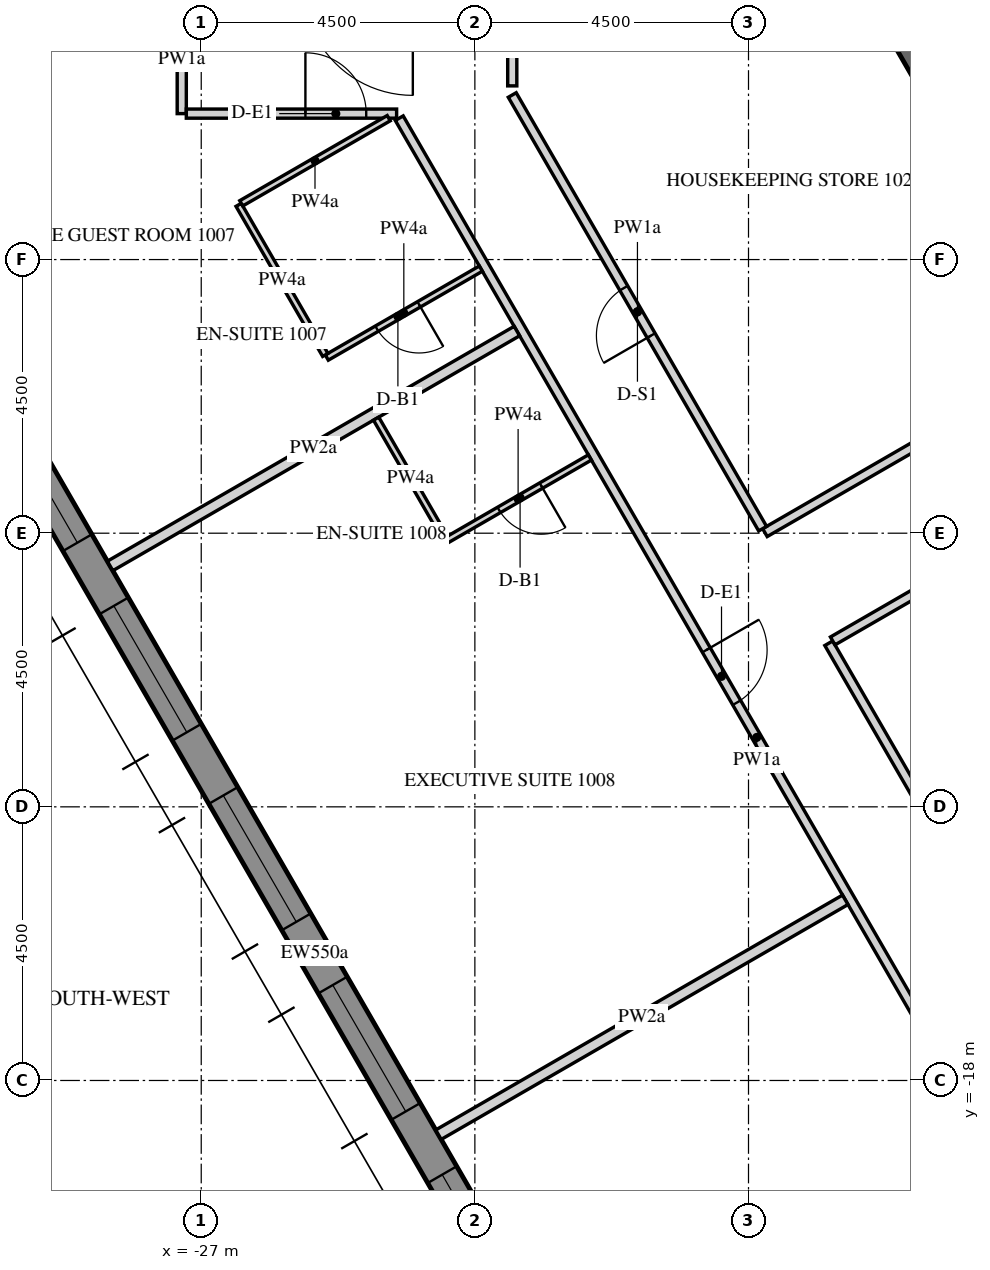
"""IFC4 building model, lengths in metres.
Left out: names, types, materials, properties, quantities, classifications, styles, units other than length and angle.
Written with IfcOpenShell. Run it as: python <this file> out.ifc"""

import sys

from ifc_helpers import new_model, si_unit, direction, frame, frame_2d, origin, place, context, subcontext, project, spatial, polyline, rectangle, outline, extrude, element, fill, save


model = new_model("IFC4")
c1 = context("Model", 3, precision=1e-05, world=origin(), true_north=direction((0.0, 1.0)))
c2 = subcontext(c1, "Body", "Model", "MODEL_VIEW")
j1 = project(units=[si_unit("LENGTHUNIT", "METRE"), si_unit("PLANEANGLEUNIT", "RADIAN")], contexts=[c1])
p1 = place(None, origin())
s1 = spatial("IfcSite", under=j1, at=p1, CompositionType="ELEMENT")
p2 = place(p1, origin())
s2 = spatial("IfcBuilding", under=s1, at=p2, CompositionType="ELEMENT")
p3 = place(p2, frame((0.0, 0.0, 142.8)))
s3 = spatial("IfcBuildingStorey", under=s2, at=p3, CompositionType="ELEMENT", Elevation=142.8)
p4 = place(p3, frame((-32.655, -2.89, -0.15), z_axis=(0.0, 0.0, 1.0), x_axis=(0.499997711317, -0.866026725152, 0.0)))
e1 = element("IfcWall", 1, at=p4, inside=s3, PredefinedType="SOLIDWALL", context=c2, shape_type="SweptSolid", body=[
    extrude(outline(polyline([(-0.022, -0.275), (30.097, -0.275), (30.045, 0.275), (0.022, 0.275), (-0.022, -0.275)])), origin(), (0.0, 0.0, 1.0), 3.75),
])
p5 = place(p4, frame((1.236, 0.0, 1.05)))
e2 = element("IfcOpeningElement", 2, at=p5, cuts=e1, PredefinedType="OPENING", context=c2, shape_type="SweptSolid", body=[
    extrude(rectangle(XDim=2.4, YDim=2.4, at=frame_2d((1.2, 1.2))), frame((0.0, 0.285, 0.0), z_axis=(0.0, -1.0, 0.0), x_axis=(1.0, 0.0, 0.0)), (0.0, 0.0, 1.0), 0.57),
])
p6 = place(p4, frame((4.835, 0.0, 1.05)))
e3 = element("IfcOpeningElement", 3, at=p6, cuts=e1, PredefinedType="OPENING", context=c2, shape_type="SweptSolid", body=[
    extrude(rectangle(XDim=2.4, YDim=2.4, at=frame_2d((1.2, 1.2))), frame((0.0, 0.285, 0.0), z_axis=(0.0, -1.0, 0.0), x_axis=(1.0, 0.0, 0.0)), (0.0, 0.0, 1.0), 0.57),
])
p7 = place(p4, frame((8.436, 0.0, 1.05)))
e4 = element("IfcOpeningElement", 4, at=p7, cuts=e1, PredefinedType="OPENING", context=c2, shape_type="SweptSolid", body=[
    extrude(rectangle(XDim=2.4, YDim=2.4, at=frame_2d((1.2, 1.2))), frame((0.0, 0.285, 0.0), z_axis=(0.0, -1.0, 0.0), x_axis=(1.0, 0.0, 0.0)), (0.0, 0.0, 1.0), 0.57),
])
p8 = place(p4, frame((12.035, 0.0, 1.05)))
e5 = element("IfcOpeningElement", 5, at=p8, cuts=e1, PredefinedType="OPENING", context=c2, shape_type="SweptSolid", body=[
    extrude(rectangle(XDim=2.4, YDim=2.4, at=frame_2d((1.2, 1.2))), frame((0.0, 0.285, 0.0), z_axis=(0.0, -1.0, 0.0), x_axis=(1.0, 0.0, 0.0)), (0.0, 0.0, 1.0), 0.57),
])
p9 = place(p4, frame((15.635, 0.0, 1.05)))
e6 = element("IfcOpeningElement", 6, at=p9, cuts=e1, PredefinedType="OPENING", context=c2, shape_type="SweptSolid", body=[
    extrude(rectangle(XDim=2.4, YDim=2.4, at=frame_2d((1.2, 1.2))), frame((0.0, 0.285, 0.0), z_axis=(0.0, -1.0, 0.0), x_axis=(1.0, 0.0, 0.0)), (0.0, 0.0, 1.0), 0.57),
])
p10 = place(p4, frame((19.236, 0.0, 1.05)))
e7 = element("IfcOpeningElement", 7, at=p10, cuts=e1, PredefinedType="OPENING", context=c2, shape_type="SweptSolid", body=[
    extrude(rectangle(XDim=2.4, YDim=2.4, at=frame_2d((1.2, 1.2))), frame((0.0, 0.285, 0.0), z_axis=(0.0, -1.0, 0.0), x_axis=(1.0, 0.0, 0.0)), (0.0, 0.0, 1.0), 0.57),
])
p11 = place(p4, frame((22.835, 0.0, 1.05)))
e8 = element("IfcOpeningElement", 8, at=p11, cuts=e1, PredefinedType="OPENING", context=c2, shape_type="SweptSolid", body=[
    extrude(rectangle(XDim=2.4, YDim=2.4, at=frame_2d((1.2, 1.2))), frame((0.0, 0.285, 0.0), z_axis=(0.0, -1.0, 0.0), x_axis=(1.0, 0.0, 0.0)), (0.0, 0.0, 1.0), 0.57),
])
p12 = place(p4, frame((26.436, 0.0, 1.05)))
e9 = element("IfcOpeningElement", 9, at=p12, cuts=e1, PredefinedType="OPENING", context=c2, shape_type="SweptSolid", body=[
    extrude(rectangle(XDim=2.4, YDim=2.4, at=frame_2d((1.2, 1.2))), frame((0.0, 0.285, 0.0), z_axis=(0.0, -1.0, 0.0), x_axis=(1.0, 0.0, 0.0)), (0.0, 0.0, 1.0), 0.57),
])
p13 = place(p3, frame((-15.819, 0.0, -0.15), z_axis=(0.0, 0.0, 1.0), x_axis=(0.499999880136, -0.866025472988, 0.0)))
e10 = element("IfcWall", 10, at=p13, inside=s3, PredefinedType="SHEAR", context=c2, shape_type="SweptSolid", body=[
    extrude(outline(polyline([(-0.173, -0.3), (15.993, -0.3), (15.646, 0.3), (0.173, 0.3), (-0.173, -0.3)])), origin(), (0.0, 0.0, 1.0), 3.75),
])
p14 = place(p13, frame((6.981, 0.0, 0.15)))
e11 = element("IfcOpeningElement", 11, at=p14, cuts=e10, PredefinedType="OPENING", context=c2, shape_type="SweptSolid", body=[
    extrude(rectangle(XDim=1.8, YDim=2.4, at=frame_2d((0.9, 1.2))), frame((0.0, 0.31, 0.0), z_axis=(0.0, -1.0, 0.0), x_axis=(1.0, 0.0, 0.0)), (0.0, 0.0, 1.0), 0.62),
])
p15 = place(p3, frame((-27.32, -0.3, 0.0), z_axis=(0.0, 0.0, 1.0), x_axis=(0.0, -1.0, 0.0)))
e12 = element("IfcWall", 12, at=p15, inside=s3, PredefinedType="PARTITIONING", context=c2, shape_type="SweptSolid", body=[
    extrude(rectangle(XDim=1.8, YDim=0.15, at=frame_2d((0.9, 0.0))), origin(), (0.0, 0.0, 1.0), 2.838),
])
p16 = place(p3, frame((-27.245, -2.1, 0.0), z_axis=(0.0, 0.0, 1.0), x_axis=(1.0, 0.0, 0.0)))
e13 = element("IfcWall", 13, at=p16, inside=s3, PredefinedType="PARTITIONING", context=c2, shape_type="SweptSolid", body=[
    extrude(rectangle(XDim=3.458, YDim=0.15, at=frame_2d((1.729, 0.0))), origin(), (0.0, 0.0, 1.0), 2.838),
])
p17 = place(p16, frame((1.958, 0.0, 0.0)))
e14 = element("IfcOpeningElement", 14, at=p17, cuts=e13, PredefinedType="OPENING", context=c2, shape_type="SweptSolid", body=[
    extrude(rectangle(XDim=1.0, YDim=2.1, at=frame_2d((0.5, 1.05))), frame((0.0, 0.085, 0.0), z_axis=(0.0, -1.0, 0.0), x_axis=(1.0, 0.0, 0.0)), (0.0, 0.0, 1.0), 0.17),
])
p18 = place(p3, frame((-23.743, -2.175, 0.0), z_axis=(0.0, 0.0, 1.0), x_axis=(0.499992353047, -0.86602981871, 0.0)))
e15 = element("IfcWall", 15, at=p18, inside=s3, PredefinedType="PARTITIONING", context=c2, shape_type="SweptSolid", body=[
    extrude(rectangle(XDim=23.516, YDim=0.15, at=frame_2d((11.758, 0.0))), origin(), (0.0, 0.0, 1.0), 2.838),
])
p19 = place(p18, frame((10.099, 0.0, 0.0)))
e16 = element("IfcOpeningElement", 16, at=p19, cuts=e15, PredefinedType="OPENING", context=c2, shape_type="SweptSolid", body=[
    extrude(rectangle(XDim=1.0, YDim=2.1, at=frame_2d((0.5, 1.05))), frame((0.0, 0.085, 0.0), z_axis=(0.0, -1.0, 0.0), x_axis=(1.0, 0.0, 0.0)), (0.0, 0.0, 1.0), 0.17),
])
p20 = place(p18, frame((17.358, 0.0, 0.0)))
e17 = element("IfcOpeningElement", 17, at=p20, cuts=e15, PredefinedType="OPENING", context=c2, shape_type="SweptSolid", body=[
    extrude(rectangle(XDim=1.0, YDim=2.1, at=frame_2d((0.5, 1.05))), frame((0.0, 0.085, 0.0), z_axis=(0.0, -1.0, 0.0), x_axis=(1.0, 0.0, 0.0)), (0.0, 0.0, 1.0), 0.17),
])
p21 = place(p3, frame((-12.664, -6.066, 0.0), z_axis=(0.0, 0.0, 1.0), x_axis=(-0.866018092707, -0.500012662943, 0.0)))
e18 = element("IfcWall", 18, at=p21, inside=s3, PredefinedType="PARTITIONING", context=c2, shape_type="SweptSolid", body=[
    extrude(rectangle(XDim=5.85, YDim=0.15, at=frame_2d((2.925, 0.0))), origin(), (0.0, 0.0, 1.0), 2.838),
])
p22 = place(p3, frame((-17.768, -8.926, 0.0), z_axis=(0.0, 0.0, 1.0), x_axis=(-0.499997033681, 0.866027116383, 0.0)))
e19 = element("IfcWall", 19, at=p22, inside=s3, PredefinedType="PARTITIONING", context=c2, shape_type="SweptSolid", body=[
    extrude(rectangle(XDim=8.235, YDim=0.15, at=frame_2d((4.118, 0.0))), origin(), (0.0, 0.0, 1.0), 2.838),
])
p23 = place(p22, frame((3.668, 0.0, 0.0)))
e20 = element("IfcOpeningElement", 20, at=p23, cuts=e19, PredefinedType="OPENING", context=c2, shape_type="SweptSolid", body=[
    extrude(rectangle(XDim=0.9, YDim=2.1, at=frame_2d((0.45, 1.05))), frame((0.0, 0.085, 0.0), z_axis=(0.0, -1.0, 0.0), x_axis=(1.0, 0.0, 0.0)), (0.0, 0.0, 1.0), 0.17),
])
p24 = place(p3, frame((-21.885, -1.644, 0.0), z_axis=(0.0, 0.0, 1.0), x_axis=(0.0, 1.0, 0.0)))
e21 = element("IfcWall", 21, at=p24, inside=s3, PredefinedType="PARTITIONING", context=c2, shape_type="SweptSolid", body=[
    extrude(rectangle(XDim=1.344, YDim=0.15, at=frame_2d((0.672, 0.0))), origin(), (0.0, 0.0, 1.0), 2.838),
])
p25 = place(p3, frame((-11.031, -20.595, 0.0), z_axis=(0.0, 0.0, 1.0), x_axis=(-0.499987422378, 0.866032665356, 0.0)))
e22 = element("IfcWall", 22, at=p25, inside=s3, PredefinedType="PARTITIONING", context=c2, shape_type="SweptSolid", body=[
    extrude(rectangle(XDim=11.299, YDim=0.15, at=frame_2d((5.649, 0.0))), origin(), (0.0, 0.0, 1.0), 2.838),
])
p26 = place(p25, frame((5.199, 0.0, 0.0)))
e23 = element("IfcOpeningElement", 23, at=p26, cuts=e22, PredefinedType="OPENING", context=c2, shape_type="SweptSolid", body=[
    extrude(rectangle(XDim=0.9, YDim=2.1, at=frame_2d((0.45, 1.05))), frame((0.0, 0.085, 0.0), z_axis=(0.0, -1.0, 0.0), x_axis=(1.0, 0.0, 0.0)), (0.0, 0.0, 1.0), 0.17),
])
p27 = place(p3, frame((-16.615, -10.772, 0.0), z_axis=(0.0, 0.0, 1.0), x_axis=(0.866025774745, 0.499999357477, 0.0)))
e24 = element("IfcWall", 24, at=p27, inside=s3, PredefinedType="PARTITIONING", context=c2, shape_type="SweptSolid", body=[
    extrude(rectangle(XDim=5.775, YDim=0.15, at=frame_2d((2.887, 0.0))), origin(), (0.0, 0.0, 1.0), 2.838),
])
p28 = place(p3, frame((-22.402, -4.649, 0.0), z_axis=(0.0, 0.0, 1.0), x_axis=(-0.865989585315, -0.500062034277, 0.0)))
e25 = element("IfcWall", 25, at=p28, inside=s3, PredefinedType="PARTITIONING", context=c2, shape_type="SweptSolid", body=[
    extrude(rectangle(XDim=2.925, YDim=0.1, at=frame_2d((1.462, 0.0))), origin(), (0.0, 0.0, 1.0), 2.838),
])
p29 = place(p28, frame((1.175, 0.0, 0.0)))
e26 = element("IfcOpeningElement", 26, at=p29, cuts=e25, PredefinedType="OPENING", context=c2, shape_type="SweptSolid", body=[
    extrude(rectangle(XDim=0.8, YDim=2.1, at=frame_2d((0.4, 1.05))), frame((0.0, 0.06, 0.0), z_axis=(0.0, -1.0, 0.0), x_axis=(1.0, 0.0, 0.0)), (0.0, 0.0, 1.0), 0.12),
])
p30 = place(p3, frame((-24.96, -6.068, 0.0), z_axis=(0.0, 0.0, 1.0), x_axis=(-0.500036373335, 0.866004402611, 0.0)))
e27 = element("IfcWall", 27, at=p30, inside=s3, PredefinedType="PARTITIONING", context=c2, shape_type="SweptSolid", body=[
    extrude(rectangle(XDim=2.85, YDim=0.1, at=frame_2d((1.425, 0.0))), origin(), (0.0, 0.0, 1.0), 2.838),
])
p31 = place(p3, frame((-26.342, -3.575, 0.0), z_axis=(0.0, 0.0, 1.0), x_axis=(0.866034573852, 0.49998411664, 0.0)))
e28 = element("IfcWall", 28, at=p31, inside=s3, PredefinedType="PARTITIONING", context=c2, shape_type="SweptSolid", body=[
    extrude(rectangle(XDim=2.8, YDim=0.1, at=frame_2d((1.4, 0.0))), origin(), (0.0, 0.0, 1.0), 2.838),
])
p32 = place(p3, frame((-28.499, -9.538, 0.0), z_axis=(0.0, 0.0, 1.0), x_axis=(0.866040859435, 0.499973229072, 0.0)))
e29 = element("IfcWall", 29, at=p32, inside=s3, PredefinedType="PARTITIONING", context=c2, shape_type="SweptSolid", body=[
    extrude(rectangle(XDim=7.725, YDim=0.18, at=frame_2d((3.863, 0.0))), origin(), (0.0, 0.0, 1.0), 2.838),
])
p33 = place(p3, frame((-20.609, -7.754, 0.0), z_axis=(0.0, 0.0, 1.0), x_axis=(-0.866012511928, -0.500022328685, 0.0)))
e30 = element("IfcWall", 30, at=p33, inside=s3, PredefinedType="PARTITIONING", context=c2, shape_type="SweptSolid", body=[
    extrude(rectangle(XDim=2.725, YDim=0.1, at=frame_2d((1.363, 0.0))), origin(), (0.0, 0.0, 1.0), 2.838),
])
p34 = place(p33, frame((0.925, 0.0, 0.0)))
e31 = element("IfcOpeningElement", 31, at=p34, cuts=e30, PredefinedType="OPENING", context=c2, shape_type="SweptSolid", body=[
    extrude(rectangle(XDim=0.8, YDim=2.1, at=frame_2d((0.4, 1.05))), frame((0.0, 0.06, 0.0), z_axis=(0.0, -1.0, 0.0), x_axis=(1.0, 0.0, 0.0)), (0.0, 0.0, 1.0), 0.12),
])
p35 = place(p3, frame((-22.994, -9.073, 0.0), z_axis=(0.0, 0.0, 1.0), x_axis=(-0.4999967785, 0.866027263711, 0.0)))
e32 = element("IfcWall", 32, at=p35, inside=s3, PredefinedType="PARTITIONING", context=c2, shape_type="SweptSolid", body=[
    extrude(rectangle(XDim=2.26, YDim=0.1, at=frame_2d((1.13, 0.0))), origin(), (0.0, 0.0, 1.0), 2.838),
])
p36 = place(p3, frame((-23.099, -18.892, 0.0), z_axis=(0.0, 0.0, 1.0), x_axis=(0.866019273868, 0.500010617176, 0.0)))
e33 = element("IfcWall", 33, at=p36, inside=s3, PredefinedType="PARTITIONING", context=c2, shape_type="SweptSolid", body=[
    extrude(rectangle(XDim=7.725, YDim=0.18, at=frame_2d((3.862, 0.0))), origin(), (0.0, 0.0, 1.0), 2.838),
])
p37 = place(p6, frame((0.0, 0.205, 0.0)))
e34 = element("IfcWindow", 34, at=p37, inside=s3, PartitioningType="DOUBLE_PANEL_VERTICAL", PredefinedType="WINDOW", context=c2, shape_type="SweptSolid", body=[
    extrude(rectangle(XDim=2.4, YDim=2.4, at=frame_2d((1.2, 1.2))), frame((0.0, 0.03, 0.0), z_axis=(0.0, -1.0, 0.0), x_axis=(1.0, 0.0, 0.0)), (0.0, 0.0, 1.0), 0.06),
])
fill(e3, e34)
p38 = place(p7, frame((0.0, 0.205, 0.0)))
e35 = element("IfcWindow", 35, at=p38, inside=s3, PartitioningType="DOUBLE_PANEL_VERTICAL", PredefinedType="WINDOW", context=c2, shape_type="SweptSolid", body=[
    extrude(rectangle(XDim=2.4, YDim=2.4, at=frame_2d((1.2, 1.2))), frame((0.0, 0.03, 0.0), z_axis=(0.0, -1.0, 0.0), x_axis=(1.0, 0.0, 0.0)), (0.0, 0.0, 1.0), 0.06),
])
fill(e4, e35)
p39 = place(p8, frame((0.0, 0.205, 0.0)))
e36 = element("IfcWindow", 36, at=p39, inside=s3, PartitioningType="DOUBLE_PANEL_VERTICAL", PredefinedType="WINDOW", context=c2, shape_type="SweptSolid", body=[
    extrude(rectangle(XDim=2.4, YDim=2.4, at=frame_2d((1.2, 1.2))), frame((0.0, 0.03, 0.0), z_axis=(0.0, -1.0, 0.0), x_axis=(1.0, 0.0, 0.0)), (0.0, 0.0, 1.0), 0.06),
])
fill(e5, e36)
p40 = place(p9, frame((0.0, 0.205, 0.0)))
e37 = element("IfcWindow", 37, at=p40, inside=s3, PartitioningType="DOUBLE_PANEL_VERTICAL", PredefinedType="WINDOW", context=c2, shape_type="SweptSolid", body=[
    extrude(rectangle(XDim=2.4, YDim=2.4, at=frame_2d((1.2, 1.2))), frame((0.0, 0.03, 0.0), z_axis=(0.0, -1.0, 0.0), x_axis=(1.0, 0.0, 0.0)), (0.0, 0.0, 1.0), 0.06),
])
fill(e6, e37)
p41 = place(p10, frame((0.0, 0.205, 0.0)))
e38 = element("IfcWindow", 38, at=p41, inside=s3, PartitioningType="DOUBLE_PANEL_VERTICAL", PredefinedType="WINDOW", context=c2, shape_type="SweptSolid", body=[
    extrude(rectangle(XDim=2.4, YDim=2.4, at=frame_2d((1.2, 1.2))), frame((0.0, 0.03, 0.0), z_axis=(0.0, -1.0, 0.0), x_axis=(1.0, 0.0, 0.0)), (0.0, 0.0, 1.0), 0.06),
])
fill(e7, e38)
p42 = place(p17, origin())
e39 = element("IfcDoor", 39, at=p42, inside=s3, OperationType="SINGLE_SWING_LEFT", PredefinedType="DOOR", context=c2, shape_type="SweptSolid", body=[
    extrude(rectangle(XDim=1.0, YDim=2.1, at=frame_2d((0.5, 1.05))), frame((0.0, 0.025, 0.0), z_axis=(0.0, -1.0, 0.0), x_axis=(1.0, 0.0, 0.0)), (0.0, 0.0, 1.0), 0.05),
])
fill(e14, e39)
p43 = place(p29, origin())
e40 = element("IfcDoor", 40, at=p43, inside=s3, OperationType="SINGLE_SWING_LEFT", PredefinedType="DOOR", context=c2, shape_type="SweptSolid", body=[
    extrude(rectangle(XDim=0.8, YDim=2.1, at=frame_2d((0.4, 1.05))), frame((0.0, 0.025, 0.0), z_axis=(0.0, -1.0, 0.0), x_axis=(1.0, 0.0, 0.0)), (0.0, 0.0, 1.0), 0.05),
])
fill(e26, e40)
p44 = place(p19, origin())
e41 = element("IfcDoor", 41, at=p44, inside=s3, OperationType="SINGLE_SWING_LEFT", PredefinedType="DOOR", context=c2, shape_type="SweptSolid", body=[
    extrude(rectangle(XDim=1.0, YDim=2.1, at=frame_2d((0.5, 1.05))), frame((0.0, 0.025, 0.0), z_axis=(0.0, -1.0, 0.0), x_axis=(1.0, 0.0, 0.0)), (0.0, 0.0, 1.0), 0.05),
])
fill(e16, e41)
p45 = place(p34, origin())
e42 = element("IfcDoor", 42, at=p45, inside=s3, OperationType="SINGLE_SWING_RIGHT", PredefinedType="DOOR", context=c2, shape_type="SweptSolid", body=[
    extrude(rectangle(XDim=0.8, YDim=2.1, at=frame_2d((0.4, 1.05))), frame((0.0, 0.025, 0.0), z_axis=(0.0, -1.0, 0.0), x_axis=(1.0, 0.0, 0.0)), (0.0, 0.0, 1.0), 0.05),
])
fill(e31, e42)
p46 = place(p23, origin())
e43 = element("IfcDoor", 43, at=p46, inside=s3, OperationType="SINGLE_SWING_RIGHT", PredefinedType="DOOR", context=c2, shape_type="SweptSolid", body=[
    extrude(rectangle(XDim=0.9, YDim=2.1, at=frame_2d((0.45, 1.05))), frame((0.0, 0.025, 0.0), z_axis=(0.0, -1.0, 0.0), x_axis=(1.0, 0.0, 0.0)), (0.0, 0.0, 1.0), 0.05),
])
fill(e20, e43)
save(model, sys.argv[1])
